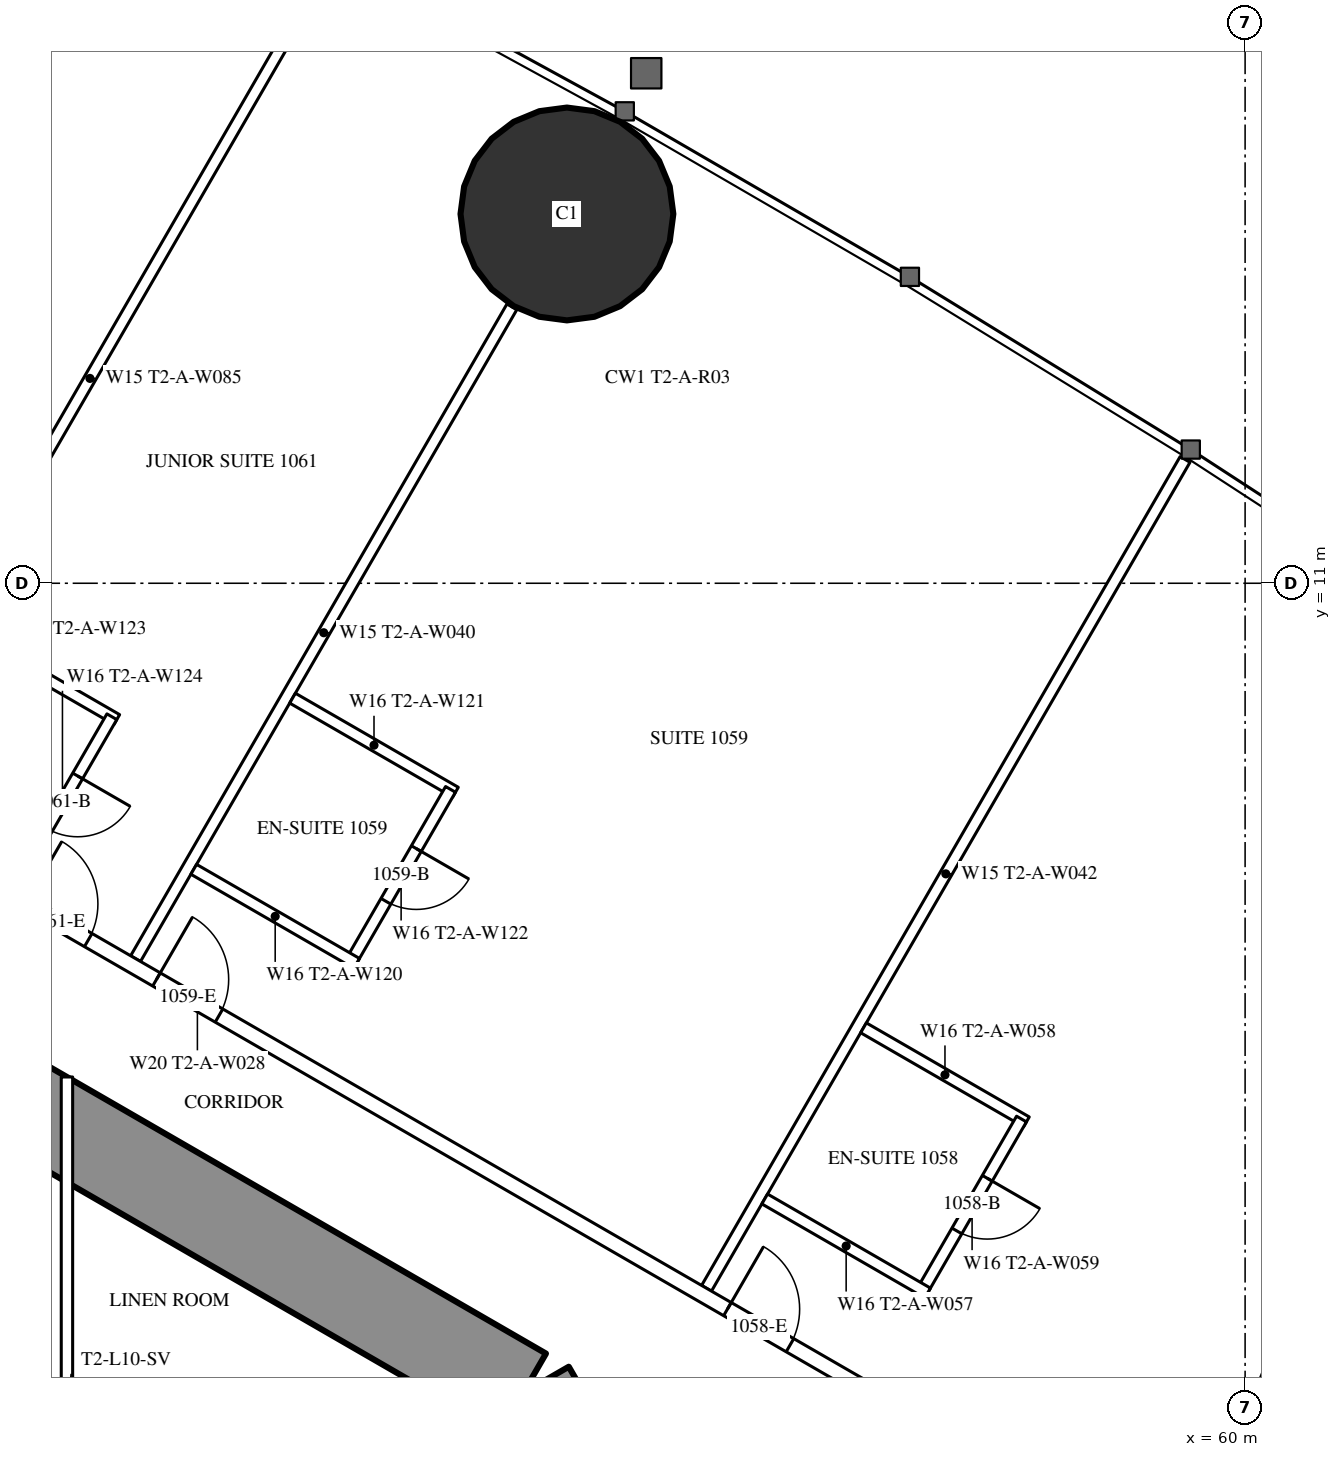
"""IFC4 building model, lengths in metres.
Left out: names, types, materials, properties, quantities, classifications, styles, units other than length and angle.
Written with IfcOpenShell. Run it as: python <this file> out.ifc"""

import sys

from ifc_helpers import new_model, si_unit, direction, frame, frame_2d, origin, origin_2d, place, context, subcontext, project, spatial, rectangle, hollow_circle, extrude, element, fill, save


model = new_model("IFC4")
c1 = context("Model", 3, precision=1e-05, world=origin(), true_north=direction((0.0, 1.0)))
c2 = subcontext(c1, "Body", "Model", "MODEL_VIEW")
j1 = project(units=[si_unit("LENGTHUNIT", "METRE"), si_unit("PLANEANGLEUNIT", "RADIAN")], contexts=[c1])
p1 = place(None, origin())
s1 = spatial("IfcSite", under=j1, at=p1, CompositionType="ELEMENT")
p2 = place(p1, origin())
s2 = spatial("IfcBuilding", under=s1, at=p2, CompositionType="ELEMENT")
p3 = place(p2, frame((0.0, 0.0, 42.5)))
s3 = spatial("IfcBuildingStorey", under=s2, at=p3, CompositionType="ELEMENT", Elevation=42.5)
p4 = place(p3, frame((51.078, 15.858, 0.0), z_axis=(0.0, 0.0, 1.0), x_axis=(1.0, 0.0, 0.0)))
e1 = element("IfcColumn", 1, at=p4, inside=s3, PredefinedType="COLUMN", context=c2, shape_type="SweptSolid", body=[
    extrude(hollow_circle(Radius=1.4, WallThickness=0.12, at=origin_2d()), origin(), (0.0, 0.0, 1.0), 3.5),
])
p5 = place(p3, frame((61.5, 0.0, 0.0), z_axis=(0.0, 0.0, 1.0), x_axis=(1.0, 0.0, 0.0)))
e2 = element("IfcColumn", 2, at=p5, inside=s3, PredefinedType="COLUMN", context=c2, shape_type="SweptSolid", body=[
    extrude(hollow_circle(Radius=1.4, WallThickness=0.1, at=origin_2d()), origin(), (0.0, 0.0, 1.0), 3.5),
])
p6 = place(p3, frame((27.2, -13.8, 0.0), z_axis=(0.0, 0.0, 1.0), x_axis=(0.866027159892, 0.499996958321, 0.0)))
e3 = element("IfcWall", 3, at=p6, inside=s3, PredefinedType="SHEAR", context=c2, shape_type="SweptSolid", body=[
    extrude(rectangle(XDim=27.947, YDim=1.2, at=frame_2d((13.973, 0.0))), origin(), (0.0, 0.0, 1.0), 3.5),
])
p7 = place(p6, frame((4.6, 0.0, 0.0)))
e4 = element("IfcOpeningElement", 4, at=p7, cuts=e3, PredefinedType="OPENING", context=c2, shape_type="SweptSolid", body=[
    extrude(rectangle(XDim=1.0, YDim=2.2, at=frame_2d((0.5, 1.1))), frame((0.0, 0.61, 0.0), z_axis=(0.0, -1.0, 0.0), x_axis=(1.0, 0.0, 0.0)), (0.0, 0.0, 1.0), 1.22),
])
p8 = place(p6, frame((13.395, 0.0, 0.0)))
e5 = element("IfcOpeningElement", 5, at=p8, cuts=e3, PredefinedType="OPENING", context=c2, shape_type="SweptSolid", body=[
    extrude(rectangle(XDim=1.8, YDim=2.2, at=frame_2d((0.9, 1.1))), frame((0.0, 0.61, 0.0), z_axis=(0.0, -1.0, 0.0), x_axis=(1.0, 0.0, 0.0)), (0.0, 0.0, 1.0), 1.22),
])
p9 = place(p3, frame((27.2, 13.8, 0.0), z_axis=(0.0, 0.0, 1.0), x_axis=(0.866024515034, -0.500001539357, 0.0)))
e6 = element("IfcWall", 6, at=p9, inside=s3, PredefinedType="SHEAR", context=c2, shape_type="SweptSolid", body=[
    extrude(rectangle(XDim=26.907, YDim=1.2, at=frame_2d((13.454, 0.0))), origin(), (0.0, 0.0, 1.0), 3.5),
])
p10 = place(p9, frame((4.6, 0.0, 0.0)))
e7 = element("IfcOpeningElement", 7, at=p10, cuts=e6, PredefinedType="OPENING", context=c2, shape_type="SweptSolid", body=[
    extrude(rectangle(XDim=1.0, YDim=2.2, at=frame_2d((0.5, 1.1))), frame((0.0, 0.61, 0.0), z_axis=(0.0, -1.0, 0.0), x_axis=(1.0, 0.0, 0.0)), (0.0, 0.0, 1.0), 1.22),
])
p11 = place(p9, frame((13.395, 0.0, 0.0)))
e8 = element("IfcOpeningElement", 8, at=p11, cuts=e6, PredefinedType="OPENING", context=c2, shape_type="SweptSolid", body=[
    extrude(rectangle(XDim=1.8, YDim=2.2, at=frame_2d((0.9, 1.1))), frame((0.0, 0.61, 0.0), z_axis=(0.0, -1.0, 0.0), x_axis=(1.0, 0.0, 0.0)), (0.0, 0.0, 1.0), 1.22),
])
p12 = place(p3, frame((41.647, 8.23, 0.0), z_axis=(0.0, 0.0, 1.0), x_axis=(0.49998590462, 0.866033541603, 0.0)))
e9 = element("IfcWall", 9, at=p12, inside=s3, PredefinedType="PARTITIONING", context=c2, shape_type="SweptSolid", body=[
    extrude(rectangle(XDim=12.621, YDim=0.15, at=frame_2d((6.311, 0.0))), origin(), (0.0, 0.0, 1.0), 3.25),
])
p13 = place(p3, frame((45.403, 6.062, 0.0), z_axis=(0.0, 0.0, 1.0), x_axis=(0.500013434677, 0.866017647131, 0.0)))
e10 = element("IfcWall", 10, at=p13, inside=s3, PredefinedType="PARTITIONING", context=c2, shape_type="SweptSolid", body=[
    extrude(rectangle(XDim=9.902, YDim=0.15, at=frame_2d((4.951, 0.0))), origin(), (0.0, 0.0, 1.0), 2.25),
])
p14 = place(p3, frame((52.915, 1.725, 0.0), z_axis=(0.0, 0.0, 1.0), x_axis=(0.499997163113, 0.866027041656, 0.0)))
e11 = element("IfcWall", 11, at=p14, inside=s3, PredefinedType="PARTITIONING", context=c2, shape_type="SweptSolid", body=[
    extrude(rectangle(XDim=12.591, YDim=0.15, at=frame_2d((6.295, 0.0))), origin(), (0.0, 0.0, 1.0), 3.25),
])
p15 = place(p3, frame((36.834, 10.894, 0.0), z_axis=(0.0, 0.0, 1.0), x_axis=(0.866028157229, -0.499995230863, 0.0)))
e12 = element("IfcWall", 12, at=p15, inside=s3, PredefinedType="PARTITIONING", context=c2, shape_type="SweptSolid", body=[
    extrude(rectangle(XDim=21.667, YDim=0.2, at=frame_2d((10.833, 0.0))), origin(), (0.0, 0.0, 1.0), 3.25),
])
p16 = place(p15, frame((18.885, 0.0, 0.0)))
e13 = element("IfcOpeningElement", 13, at=p16, cuts=e12, PredefinedType="OPENING", context=c2, shape_type="SweptSolid", body=[
    extrude(rectangle(XDim=0.95, YDim=2.2, at=frame_2d((0.475, 1.1))), frame((0.0, 0.11, 0.0), z_axis=(0.0, -1.0, 0.0), x_axis=(1.0, 0.0, 0.0)), (0.0, 0.0, 1.0), 0.22),
])
p17 = place(p15, frame((10.212, 0.0, 0.0)))
e14 = element("IfcOpeningElement", 14, at=p17, cuts=e12, PredefinedType="OPENING", context=c2, shape_type="SweptSolid", body=[
    extrude(rectangle(XDim=0.95, YDim=2.2, at=frame_2d((0.475, 1.1))), frame((0.0, 0.11, 0.0), z_axis=(0.0, -1.0, 0.0), x_axis=(1.0, 0.0, 0.0)), (0.0, 0.0, 1.0), 0.22),
])
p18 = place(p15, frame((8.225, 0.0, 0.0)))
e15 = element("IfcOpeningElement", 15, at=p18, cuts=e12, PredefinedType="OPENING", context=c2, shape_type="SweptSolid", body=[
    extrude(rectangle(XDim=0.95, YDim=2.2, at=frame_2d((0.475, 1.1))), frame((0.0, 0.11, 0.0), z_axis=(0.0, -1.0, 0.0), x_axis=(1.0, 0.0, 0.0)), (0.0, 0.0, 1.0), 0.22),
])
p19 = place(p15, frame((1.825, 0.0, 0.0)))
e16 = element("IfcOpeningElement", 16, at=p19, cuts=e12, PredefinedType="OPENING", context=c2, shape_type="SweptSolid", body=[
    extrude(rectangle(XDim=0.95, YDim=2.2, at=frame_2d((0.475, 1.1))), frame((0.0, 0.11, 0.0), z_axis=(0.0, -1.0, 0.0), x_axis=(1.0, 0.0, 0.0)), (0.0, 0.0, 1.0), 0.22),
])
p20 = place(p15, frame((0.246, 0.0, 0.0)))
e17 = element("IfcOpeningElement", 17, at=p20, cuts=e12, PredefinedType="OPENING", context=c2, shape_type="SweptSolid", body=[
    extrude(rectangle(XDim=0.9, YDim=2.2, at=frame_2d((0.45, 1.1))), frame((0.0, 0.11, 0.0), z_axis=(0.0, -1.0, 0.0), x_axis=(1.0, 0.0, 0.0)), (0.0, 0.0, 1.0), 0.22),
])
p21 = place(p3, frame((54.98, 5.151, 0.0), z_axis=(0.0, 0.0, 1.0), x_axis=(0.86604923931, -0.499958713387, 0.0)))
e18 = element("IfcWall", 18, at=p21, inside=s3, PredefinedType="PARTITIONING", context=c2, shape_type="SweptSolid", body=[
    extrude(rectangle(XDim=2.475, YDim=0.15, at=frame_2d((1.237, 0.0))), origin(), (0.0, 0.0, 1.0), 3.25),
])
p22 = place(p3, frame((55.758, 1.7, 0.0), z_axis=(0.0, 0.0, 1.0), x_axis=(0.500006934395, 0.866021400173, 0.0)))
e19 = element("IfcWall", 19, at=p22, inside=s3, PredefinedType="PARTITIONING", context=c2, shape_type="SweptSolid", body=[
    extrude(rectangle(XDim=2.6, YDim=0.15, at=frame_2d((1.3, 0.0))), origin(), (0.0, 0.0, 1.0), 3.25),
])
p23 = place(p22, frame((0.9, 0.0, 0.0)))
e20 = element("IfcOpeningElement", 20, at=p23, cuts=e19, PredefinedType="OPENING", context=c2, shape_type="SweptSolid", body=[
    extrude(rectangle(XDim=0.8, YDim=2.2, at=frame_2d((0.4, 1.1))), frame((0.0, 0.085, 0.0), z_axis=(0.0, -1.0, 0.0), x_axis=(1.0, 0.0, 0.0)), (0.0, 0.0, 1.0), 0.17),
])
for number, where, z_axis, x_axis in (
    (21, (53.68, 2.9, 0.0), (0.0, 0.0, 1.0), (0.866, -0.5, 0.0)),
    (22, (47.468, 9.488, 0.0), (0.0, 0.0, 1.0), (0.866, -0.5, 0.0)),
):
    element("IfcWall", number, at=place(p3, frame(where, z_axis=z_axis, x_axis=x_axis)), inside=s3, PredefinedType="PARTITIONING", context=c2, shape_type="SweptSolid", body=[
        extrude(rectangle(XDim=2.475, YDim=0.15, at=frame_2d((1.237, 0.0))), origin(), (0.0, 0.0, 1.0), 3.25),
    ])
p24 = place(p3, frame((48.246, 6.037, 0.0), z_axis=(0.0, 0.0, 1.0), x_axis=(0.500006934395, 0.866021400173, 0.0)))
e23 = element("IfcWall", 23, at=p24, inside=s3, PredefinedType="PARTITIONING", context=c2, shape_type="SweptSolid", body=[
    extrude(rectangle(XDim=2.6, YDim=0.15, at=frame_2d((1.3, 0.0))), origin(), (0.0, 0.0, 1.0), 3.25),
])
p25 = place(p24, frame((0.9, 0.0, 0.0)))
e24 = element("IfcOpeningElement", 24, at=p25, cuts=e23, PredefinedType="OPENING", context=c2, shape_type="SweptSolid", body=[
    extrude(rectangle(XDim=0.8, YDim=2.2, at=frame_2d((0.4, 1.1))), frame((0.0, 0.085, 0.0), z_axis=(0.0, -1.0, 0.0), x_axis=(1.0, 0.0, 0.0)), (0.0, 0.0, 1.0), 0.17),
])
p26 = place(p3, frame((46.168, 7.237, 0.0), z_axis=(0.0, 0.0, 1.0), x_axis=(0.866006523861, -0.500032699561, 0.0)))
e25 = element("IfcWall", 25, at=p26, inside=s3, PredefinedType="PARTITIONING", context=c2, shape_type="SweptSolid", body=[
    extrude(rectangle(XDim=2.475, YDim=0.15, at=frame_2d((1.237, 0.0))), origin(), (0.0, 0.0, 1.0), 3.25),
])
p27 = place(p3, frame((43.012, 10.444, 0.0), z_axis=(0.0, 0.0, 1.0), x_axis=(0.866031185235, -0.4999899861, 0.0)))
e26 = element("IfcWall", 26, at=p27, inside=s3, PredefinedType="PARTITIONING", context=c2, shape_type="SweptSolid", body=[
    extrude(rectangle(XDim=2.475, YDim=0.15, at=frame_2d((1.238, 0.0))), origin(), (0.0, 0.0, 1.0), 3.25),
])
p28 = place(p3, frame((43.791, 6.993, 0.0), z_axis=(0.0, 0.0, 1.0), x_axis=(0.500047596559, 0.865997922154, 0.0)))
e27 = element("IfcWall", 27, at=p28, inside=s3, PredefinedType="PARTITIONING", context=c2, shape_type="SweptSolid", body=[
    extrude(rectangle(XDim=2.6, YDim=0.15, at=frame_2d((1.3, 0.0))), origin(), (0.0, 0.0, 1.0), 3.25),
])
p29 = place(p28, frame((0.9, 0.0, 0.0)))
e28 = element("IfcOpeningElement", 28, at=p29, cuts=e27, PredefinedType="OPENING", context=c2, shape_type="SweptSolid", body=[
    extrude(rectangle(XDim=0.8, YDim=2.2, at=frame_2d((0.4, 1.1))), frame((0.0, 0.085, 0.0), z_axis=(0.0, -1.0, 0.0), x_axis=(1.0, 0.0, 0.0)), (0.0, 0.0, 1.0), 0.17),
])
p30 = place(p3, frame((44.5, -4.505, 0.0), z_axis=(0.0, 0.0, 1.0), x_axis=(0.0, 1.0, 0.0)))
e29 = element("IfcWall", 29, at=p30, inside=s3, PredefinedType="PARTITIONING", context=c2, shape_type="SweptSolid", body=[
    extrude(rectangle(XDim=9.009, YDim=0.15, at=frame_2d((4.505, 0.0))), origin(), (0.0, 0.0, 1.0), 2.45),
])
p31 = place(p30, frame((4.005, 0.0, 0.0)))
e30 = element("IfcOpeningElement", 30, at=p31, cuts=e29, PredefinedType="OPENING", context=c2, shape_type="SweptSolid", body=[
    extrude(rectangle(XDim=1.0, YDim=2.2, at=frame_2d((0.5, 1.1))), frame((0.0, 0.085, 0.0), z_axis=(0.0, -1.0, 0.0), x_axis=(1.0, 0.0, 0.0)), (0.0, 0.0, 1.0), 0.17),
])
p32 = place(p23, origin())
e31 = element("IfcDoor", 31, at=p32, inside=s3, OperationType="SINGLE_SWING_RIGHT", PredefinedType="DOOR", context=c2, shape_type="SweptSolid", body=[
    extrude(rectangle(XDim=0.8, YDim=2.2, at=frame_2d((0.4, 1.1))), frame((0.0, 0.025, 0.0), z_axis=(0.0, -1.0, 0.0), x_axis=(1.0, 0.0, 0.0)), (0.0, 0.0, 1.0), 0.05),
])
fill(e20, e31)
p33 = place(p16, origin())
e32 = element("IfcDoor", 32, at=p33, inside=s3, OperationType="SINGLE_SWING_LEFT", PredefinedType="DOOR", context=c2, shape_type="SweptSolid", body=[
    extrude(rectangle(XDim=0.95, YDim=2.2, at=frame_2d((0.475, 1.1))), frame((0.0, 0.025, 0.0), z_axis=(0.0, -1.0, 0.0), x_axis=(1.0, 0.0, 0.0)), (0.0, 0.0, 1.0), 0.05),
])
fill(e13, e32)
p34 = place(p25, origin())
e33 = element("IfcDoor", 33, at=p34, inside=s3, OperationType="SINGLE_SWING_RIGHT", PredefinedType="DOOR", context=c2, shape_type="SweptSolid", body=[
    extrude(rectangle(XDim=0.8, YDim=2.2, at=frame_2d((0.4, 1.1))), frame((0.0, 0.025, 0.0), z_axis=(0.0, -1.0, 0.0), x_axis=(1.0, 0.0, 0.0)), (0.0, 0.0, 1.0), 0.05),
])
fill(e24, e33)
p35 = place(p17, origin())
e34 = element("IfcDoor", 34, at=p35, inside=s3, OperationType="SINGLE_SWING_LEFT", PredefinedType="DOOR", context=c2, shape_type="SweptSolid", body=[
    extrude(rectangle(XDim=0.95, YDim=2.2, at=frame_2d((0.475, 1.1))), frame((0.0, 0.025, 0.0), z_axis=(0.0, -1.0, 0.0), x_axis=(1.0, 0.0, 0.0)), (0.0, 0.0, 1.0), 0.05),
])
fill(e14, e34)
p36 = place(p29, origin())
e35 = element("IfcDoor", 35, at=p36, inside=s3, OperationType="SINGLE_SWING_RIGHT", PredefinedType="DOOR", context=c2, shape_type="SweptSolid", body=[
    extrude(rectangle(XDim=0.8, YDim=2.2, at=frame_2d((0.4, 1.1))), frame((0.0, 0.025, 0.0), z_axis=(0.0, -1.0, 0.0), x_axis=(1.0, 0.0, 0.0)), (0.0, 0.0, 1.0), 0.05),
])
fill(e28, e35)
p37 = place(p18, origin())
e36 = element("IfcDoor", 36, at=p37, inside=s3, OperationType="SINGLE_SWING_LEFT", PredefinedType="DOOR", context=c2, shape_type="SweptSolid", body=[
    extrude(rectangle(XDim=0.95, YDim=2.2, at=frame_2d((0.475, 1.1))), frame((0.0, 0.025, 0.0), z_axis=(0.0, -1.0, 0.0), x_axis=(1.0, 0.0, 0.0)), (0.0, 0.0, 1.0), 0.05),
])
fill(e15, e36)
save(model, sys.argv[1])
